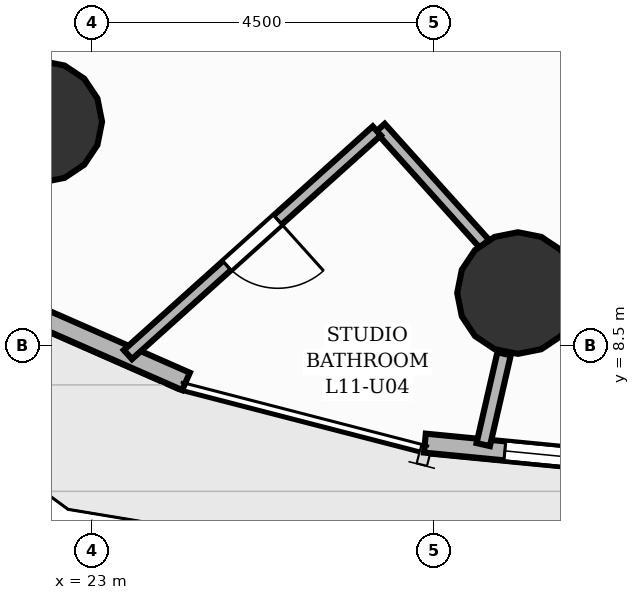
"""IFC4 building model, lengths in metres.
Left out: names, types, materials, properties, quantities, classifications, styles, units other than length and angle.
Written with IfcOpenShell. Run it as: python <this file> out.ifc"""

import sys

from ifc_helpers import new_model, si_unit, direction, frame, frame_2d, origin, origin_2d, place, context, subcontext, project, spatial, rectangle, circle, extrude, element, fill, save


model = new_model("IFC4")
c1 = context("Model", 3, precision=1e-05, world=origin(), true_north=direction((0.0, 1.0)))
c2 = subcontext(c1, "Body", "Model", "MODEL_VIEW")
j1 = project(units=[si_unit("LENGTHUNIT", "METRE"), si_unit("PLANEANGLEUNIT", "RADIAN")], contexts=[c1])
p1 = place(None, origin())
s1 = spatial("IfcSite", under=j1, at=p1, CompositionType="ELEMENT")
p2 = place(p1, origin())
s2 = spatial("IfcBuilding", under=s1, at=p2, CompositionType="ELEMENT")
p3 = place(p2, frame((0.0, 0.0, 40.8)))
s3 = spatial("IfcBuildingStorey", under=s2, at=p3, CompositionType="ELEMENT", Elevation=40.8)
for number, where, z_axis, x_axis in (
    (1, (22.333, 11.445, 0.0), (0.0, 0.0, 1.0), (1.0, 0.0, 0.0)),
    (2, (28.605, 9.19, 0.0), (0.0, 0.0, 1.0), (1.0, 0.0, 0.0)),
):
    element("IfcColumn", number, at=place(p3, frame(where, z_axis=z_axis, x_axis=x_axis)), inside=s3, PredefinedType="COLUMN", context=c2, shape_type="SweptSolid", body=[
        extrude(circle(Radius=0.8, at=origin_2d()), origin(), (0.0, 0.0, 1.0), 3.2),
    ])
p4 = place(p3, frame((24.237, 8.028, 0.0), z_axis=(0.0, 0.0, 1.0), x_axis=(-0.915312914138, 0.402743428515, 0.0)))
e3 = element("IfcWall", 3, at=p4, inside=s3, PredefinedType="SOLIDWALL", context=c2, shape_type="SweptSolid", body=[
    extrude(rectangle(XDim=3.399, YDim=0.25, at=frame_2d((1.699, 0.0))), origin(), (0.0, 0.0, 1.0), 2.96),
])
p5 = place(p3, frame((30.877, 6.876, 0.0), z_axis=(0.0, 0.0, 1.0), x_axis=(-0.995323323337, 0.096599596386, 0.0)))
e4 = element("IfcWall", 4, at=p5, inside=s3, PredefinedType="SOLIDWALL", context=c2, shape_type="SweptSolid", body=[
    extrude(rectangle(XDim=3.513, YDim=0.25, at=frame_2d((1.756, 0.0))), origin(), (0.0, 0.0, 1.0), 2.96),
])
p6 = place(p5, frame((1.056, 0.0, 0.85)))
e5 = element("IfcOpeningElement", 5, at=p6, cuts=e4, PredefinedType="OPENING", context=c2, shape_type="SweptSolid", body=[
    extrude(rectangle(XDim=1.4, YDim=1.29, at=frame_2d((0.7, 0.645))), frame((0.0, 0.135, 0.0), z_axis=(0.0, -1.0, 0.0), x_axis=(1.0, 0.0, 0.0)), (0.0, 0.0, 1.0), 0.27),
])
p7 = place(p3, frame((28.422, 8.391, 0.0), z_axis=(0.0, 0.0, 1.0), x_axis=(-0.223317008343, -0.974745871386, 0.0)))
e6 = element("IfcWall", 6, at=p7, inside=s3, PredefinedType="PARTITIONING", context=c2, shape_type="SweptSolid", body=[
    extrude(rectangle(XDim=1.226, YDim=0.18, at=frame_2d((0.613, 0.0))), origin(), (0.0, 0.0, 1.0), 2.178),
])
p8 = place(p3, frame((28.164, 9.837, 0.0), z_axis=(0.0, 0.0, 1.0), x_axis=(-0.668451915184, 0.743755361048, 0.0)))
e7 = element("IfcWall", 7, at=p8, inside=s3, PredefinedType="PLUMBINGWALL", context=c2, shape_type="SweptSolid", body=[
    extrude(rectangle(XDim=2.052, YDim=0.16, at=frame_2d((1.026, 0.0))), origin(), (0.0, 0.0, 1.0), 2.955),
])
p9 = place(p3, frame((26.748, 11.324, 0.0), z_axis=(0.0, 0.0, 1.0), x_axis=(-0.743726854299, -0.668483631957, 0.0)))
e8 = element("IfcWall", 8, at=p9, inside=s3, PredefinedType="PLUMBINGWALL", context=c2, shape_type="SweptSolid", body=[
    extrude(rectangle(XDim=4.403, YDim=0.16, at=frame_2d((2.202, 0.0))), origin(), (0.0, 0.0, 1.0), 2.955),
])
p10 = place(p9, frame((1.751, 0.0, 0.0)))
e9 = element("IfcOpeningElement", 9, at=p10, cuts=e8, PredefinedType="OPENING", context=c2, shape_type="SweptSolid", body=[
    extrude(rectangle(XDim=0.9, YDim=2.1, at=frame_2d((0.45, 1.05))), frame((0.0, 0.09, 0.0), z_axis=(0.0, -1.0, 0.0), x_axis=(1.0, 0.0, 0.0)), (0.0, 0.0, 1.0), 0.18),
])
p11 = place(p6, origin())
e10 = element("IfcWindow", 10, at=p11, inside=s3, PartitioningType="SINGLE_PANEL", PredefinedType="WINDOW", context=c2, shape_type="SweptSolid", body=[
    extrude(rectangle(XDim=1.4, YDim=1.29, at=frame_2d((0.7, 0.645))), frame((0.0, 0.03, 0.0), z_axis=(0.0, -1.0, 0.0), x_axis=(1.0, 0.0, 0.0)), (0.0, 0.0, 1.0), 0.06),
])
fill(e5, e10)
p12 = place(p10, origin())
e11 = element("IfcDoor", 11, at=p12, inside=s3, OperationType="SINGLE_SWING_LEFT", PredefinedType="DOOR", context=c2, shape_type="SweptSolid", body=[
    extrude(rectangle(XDim=0.9, YDim=2.1, at=frame_2d((0.45, 1.05))), frame((0.0, 0.025, 0.0), z_axis=(0.0, -1.0, 0.0), x_axis=(1.0, 0.0, 0.0)), (0.0, 0.0, 1.0), 0.05),
])
fill(e9, e11)
save(model, sys.argv[1])
